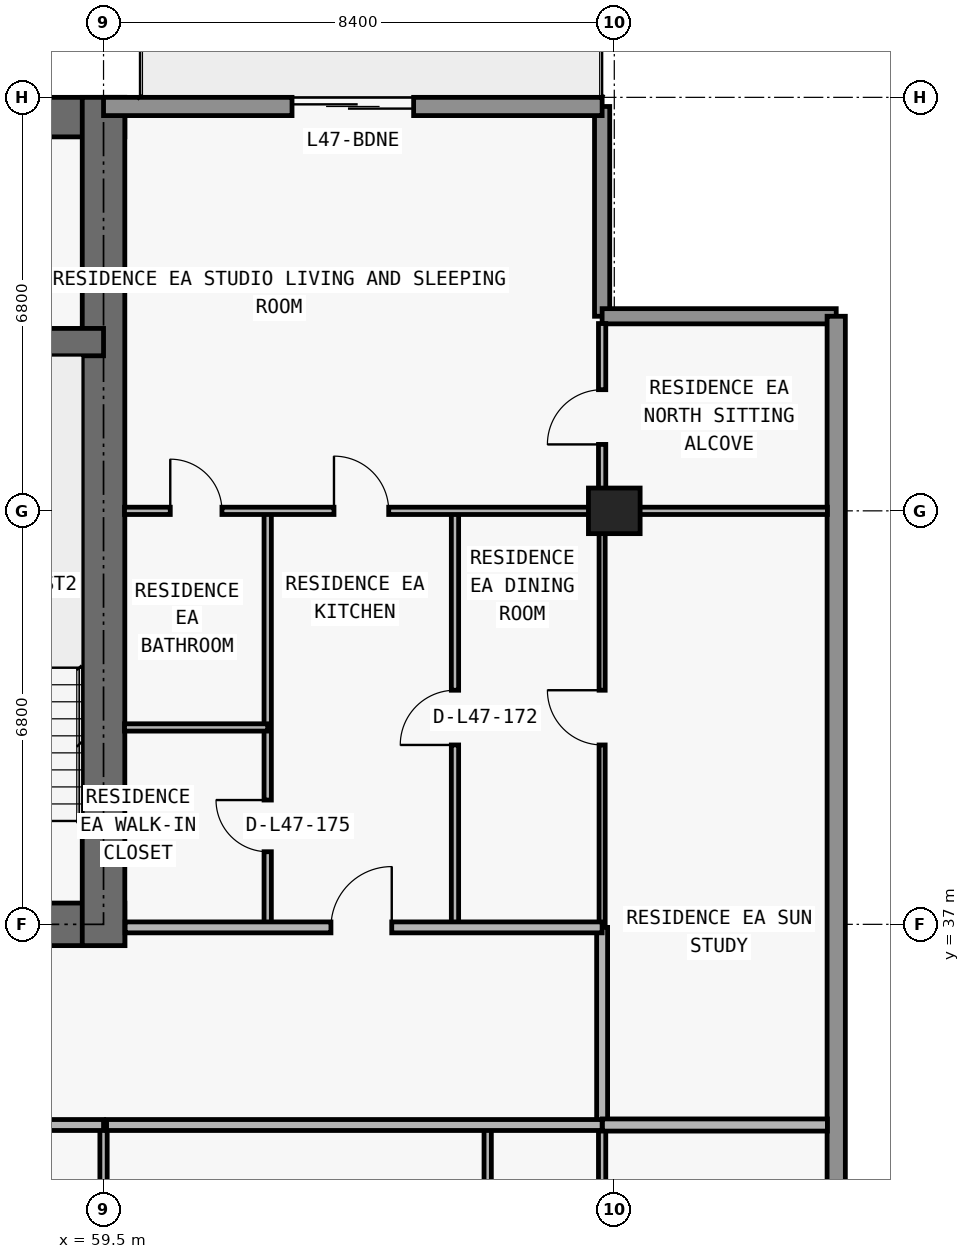
"""IFC4 building model, lengths in metres.
Left out: names, types, materials, properties, quantities, classifications, styles, units other than length and angle.
Written with IfcOpenShell. Run it as: python <this file> out.ifc"""

import sys

from ifc_helpers import new_model, si_unit, direction, frame, frame_2d, origin, origin_2d, place, context, subcontext, project, spatial, rectangle, extrude, element, fill, save


model = new_model("IFC4")
c1 = context("Model", 3, precision=1e-05, world=origin(), true_north=direction((0.0, 1.0)))
c2 = subcontext(c1, "Body", "Model", "MODEL_VIEW")
j1 = project(units=[si_unit("LENGTHUNIT", "METRE"), si_unit("PLANEANGLEUNIT", "RADIAN")], contexts=[c1])
p1 = place(None, origin())
s1 = spatial("IfcSite", under=j1, at=p1, CompositionType="ELEMENT")
p2 = place(p1, origin())
s2 = spatial("IfcBuilding", under=s1, at=p2, CompositionType="ELEMENT")
p3 = place(p2, frame((0.0, 0.0, 170.4)))
s3 = spatial("IfcBuildingStorey", under=s2, at=p3, CompositionType="ELEMENT", Elevation=170.4)
p4 = place(p3, frame((67.9, 43.8, 0.0), z_axis=(0.0, 0.0, 1.0), x_axis=(1.0, 0.0, 0.0)))
e1 = element("IfcColumn", 1, at=p4, inside=s3, PredefinedType="COLUMN", context=c2, shape_type="SweptSolid", body=[
    extrude(rectangle(XDim=0.85, YDim=0.75, at=origin_2d()), origin(), (0.0, 0.0, 1.0), 3.05),
])
p5 = place(p3, frame((17.95, 37.0, 0.0), z_axis=(0.0, 0.0, 1.0), x_axis=(1.0, 0.0, 0.0)))
e2 = element("IfcWall", 2, at=p5, inside=s3, PredefinedType="SHEAR", context=c2, shape_type="SweptSolid", body=[
    extrude(rectangle(XDim=41.9, YDim=0.7, at=frame_2d((20.95, 0.0))), origin(), (0.0, 0.0, 1.0), 3.05),
])
p6 = place(p5, frame((14.35, 0.0, 0.0)))
e3 = element("IfcOpeningElement", 3, at=p6, cuts=e2, PredefinedType="OPENING", context=c2, shape_type="SweptSolid", body=[
    extrude(rectangle(XDim=1.1, YDim=2.15, at=frame_2d((0.55, 1.075))), frame((0.0, 0.36, 0.0), z_axis=(0.0, -1.0, 0.0), x_axis=(1.0, 0.0, 0.0)), (0.0, 0.0, 1.0), 0.72),
])
p7 = place(p5, frame((6.2, 0.0, 0.0)))
e4 = element("IfcOpeningElement", 4, at=p7, cuts=e2, PredefinedType="OPENING", context=c2, shape_type="SweptSolid", body=[
    extrude(rectangle(XDim=1.05, YDim=2.15, at=frame_2d((0.525, 1.075))), frame((0.0, 0.36, 0.0), z_axis=(0.0, -1.0, 0.0), x_axis=(1.0, 0.0, 0.0)), (0.0, 0.0, 1.0), 0.72),
])
p8 = place(p5, frame((34.7, 0.0, 0.0)))
e5 = element("IfcOpeningElement", 5, at=p8, cuts=e2, PredefinedType="OPENING", context=c2, shape_type="SweptSolid", body=[
    extrude(rectangle(XDim=1.05, YDim=2.15, at=frame_2d((0.525, 1.075))), frame((0.0, 0.36, 0.0), z_axis=(0.0, -1.0, 0.0), x_axis=(1.0, 0.0, 0.0)), (0.0, 0.0, 1.0), 0.72),
])
p9 = place(p5, frame((10.812, 0.0, 0.0)))
e6 = element("IfcOpeningElement", 6, at=p9, cuts=e2, PredefinedType="OPENING", context=c2, shape_type="SweptSolid", body=[
    extrude(rectangle(XDim=1.05, YDim=2.15, at=frame_2d((0.525, 1.075))), frame((0.0, 0.36, 0.0), z_axis=(0.0, -1.0, 0.0), x_axis=(1.0, 0.0, 0.0)), (0.0, 0.0, 1.0), 0.72),
])
p10 = place(p5, frame((24.05, 0.0, 0.0)))
e7 = element("IfcOpeningElement", 7, at=p10, cuts=e2, PredefinedType="OPENING", context=c2, shape_type="SweptSolid", body=[
    extrude(rectangle(XDim=1.05, YDim=2.15, at=frame_2d((0.525, 1.075))), frame((0.0, 0.36, 0.0), z_axis=(0.0, -1.0, 0.0), x_axis=(1.0, 0.0, 0.0)), (0.0, 0.0, 1.0), 0.72),
])
p11 = place(p3, frame((17.95, 50.275, 0.0), z_axis=(0.0, 0.0, 1.0), x_axis=(1.0, 0.0, 0.0)))
e8 = element("IfcWall", 8, at=p11, inside=s3, PredefinedType="SHEAR", context=c2, shape_type="SweptSolid", body=[
    extrude(rectangle(XDim=41.9, YDim=0.65, at=frame_2d((20.95, 0.0))), origin(), (0.0, 0.0, 1.0), 3.05),
])
p12 = place(p3, frame((59.5, 36.65, 0.0), z_axis=(0.0, 0.0, 1.0), x_axis=(0.0, 1.0, 0.0)))
e9 = element("IfcWall", 9, at=p12, inside=s3, PredefinedType="SHEAR", context=c2, shape_type="SweptSolid", body=[
    extrude(rectangle(XDim=13.95, YDim=0.7, at=frame_2d((6.975, 0.0))), origin(), (0.0, 0.0, 1.0), 3.05),
])
p13 = place(p3, frame((18.3, 46.575, 0.0), z_axis=(0.0, 0.0, 1.0), x_axis=(1.0, 0.0, 0.0)))
e10 = element("IfcWall", 10, at=p13, inside=s3, PredefinedType="SHEAR", context=c2, shape_type="SweptSolid", body=[
    extrude(rectangle(XDim=41.2, YDim=0.45, at=frame_2d((20.6, 0.0))), origin(), (0.0, 0.0, 1.0), 3.05),
])
p14 = place(p13, frame((7.575, 0.0, 0.0)))
e11 = element("IfcOpeningElement", 11, at=p14, cuts=e10, PredefinedType="OPENING", context=c2, shape_type="SweptSolid", body=[
    extrude(rectangle(XDim=1.05, YDim=2.15, at=frame_2d((0.525, 1.075))), frame((0.0, 0.235, 0.0), z_axis=(0.0, -1.0, 0.0), x_axis=(1.0, 0.0, 0.0)), (0.0, 0.0, 1.0), 0.47),
])
p15 = place(p13, frame((32.625, 0.0, 0.0)))
e12 = element("IfcOpeningElement", 12, at=p15, cuts=e10, PredefinedType="OPENING", context=c2, shape_type="SweptSolid", body=[
    extrude(rectangle(XDim=1.05, YDim=2.15, at=frame_2d((0.525, 1.075))), frame((0.0, 0.235, 0.0), z_axis=(0.0, -1.0, 0.0), x_axis=(1.0, 0.0, 0.0)), (0.0, 0.0, 1.0), 0.47),
])
p16 = place(p3, frame((67.7, 50.45, 0.0), z_axis=(0.0, 0.0, 1.0), x_axis=(0.0, -1.0, 0.0)))
e13 = element("IfcWall", 13, at=p16, inside=s3, PredefinedType="ELEMENTEDWALL", context=c2, shape_type="SweptSolid", body=[
    extrude(rectangle(XDim=3.45, YDim=0.25, at=frame_2d((1.725, 0.0))), origin(), (0.0, 0.0, 1.0), 3.05),
])
p17 = place(p3, frame((67.7, 47.0, 0.0), z_axis=(0.0, 0.0, 1.0), x_axis=(1.0, 0.0, 0.0)))
e14 = element("IfcWall", 14, at=p17, inside=s3, PredefinedType="ELEMENTEDWALL", context=c2, shape_type="SweptSolid", body=[
    extrude(rectangle(XDim=3.85, YDim=0.25, at=frame_2d((1.925, 0.0))), origin(), (0.0, 0.0, 1.0), 3.05),
])
p18 = place(p3, frame((71.55, 47.0, 0.0), z_axis=(0.0, 0.0, 1.0), x_axis=(0.0, -1.0, 0.0)))
e15 = element("IfcWall", 15, at=p18, inside=s3, PredefinedType="STANDARD", context=c2, shape_type="SweptSolid", body=[
    extrude(rectangle(XDim=17.9, YDim=0.3, at=frame_2d((8.95, 0.0))), origin(), (0.0, 0.0, 1.0), 3.05),
])
p19 = place(p3, frame((59.5, 50.45, 0.0), z_axis=(0.0, 0.0, 1.0), x_axis=(1.0, 0.0, 0.0)))
e16 = element("IfcWall", 16, at=p19, inside=s3, PredefinedType="STANDARD", context=c2, shape_type="SweptSolid", body=[
    extrude(rectangle(XDim=8.2, YDim=0.3, at=frame_2d((4.1, 0.0))), origin(), (0.0, 0.0, 1.0), 3.05),
])
p20 = place(p19, frame((3.1, 0.0, 0.0)))
e17 = element("IfcOpeningElement", 17, at=p20, cuts=e16, PredefinedType="OPENING", context=c2, shape_type="SweptSolid", body=[
    extrude(rectangle(XDim=2.0, YDim=2.3, at=frame_2d((1.0, 1.15))), frame((0.0, 0.16, 0.0), z_axis=(0.0, -1.0, 0.0), x_axis=(1.0, 0.0, 0.0)), (0.0, 0.0, 1.0), 0.32),
])
p21 = place(p3, frame((59.5, 29.44, 0.0), z_axis=(0.0, 0.0, 1.0), x_axis=(0.0, 1.0, 0.0)))
e18 = element("IfcWall", 18, at=p21, inside=s3, PredefinedType="PARTITIONING", context=c2, shape_type="SweptSolid", body=[
    extrude(rectangle(XDim=4.26, YDim=0.12, at=frame_2d((2.13, 0.0))), origin(), (0.0, 0.0, 1.0), 2.263),
])
p22 = place(p3, frame((62.2, 37.0, 0.0), z_axis=(0.0, 0.0, 1.0), x_axis=(0.0, 1.0, 0.0)))
e19 = element("IfcWall", 19, at=p22, inside=s3, PredefinedType="PARTITIONING", context=c2, shape_type="SweptSolid", body=[
    extrude(rectangle(XDim=6.8, YDim=0.12, at=frame_2d((3.4, 0.0))), origin(), (0.0, 0.0, 1.0), 3.05),
])
p23 = place(p22, frame((1.194, 0.0, 0.0)))
e20 = element("IfcOpeningElement", 20, at=p23, cuts=e19, PredefinedType="OPENING", context=c2, shape_type="SweptSolid", body=[
    extrude(rectangle(XDim=0.85, YDim=2.1, at=frame_2d((0.425, 1.05))), frame((0.0, 0.07, 0.0), z_axis=(0.0, -1.0, 0.0), x_axis=(1.0, 0.0, 0.0)), (0.0, 0.0, 1.0), 0.14),
])
p24 = place(p3, frame((65.28, 37.0, 0.0), z_axis=(0.0, 0.0, 1.0), x_axis=(0.0, 1.0, 0.0)))
e21 = element("IfcWall", 21, at=p24, inside=s3, PredefinedType="PARTITIONING", context=c2, shape_type="SweptSolid", body=[
    extrude(rectangle(XDim=6.8, YDim=0.12, at=frame_2d((3.4, 0.0))), origin(), (0.0, 0.0, 1.0), 3.05),
])
p25 = place(p24, frame((2.95, 0.0, 0.0)))
e22 = element("IfcOpeningElement", 22, at=p25, cuts=e21, PredefinedType="OPENING", context=c2, shape_type="SweptSolid", body=[
    extrude(rectangle(XDim=0.9, YDim=2.15, at=frame_2d((0.45, 1.075))), frame((0.0, 0.07, 0.0), z_axis=(0.0, -1.0, 0.0), x_axis=(1.0, 0.0, 0.0)), (0.0, 0.0, 1.0), 0.14),
])
p26 = place(p3, frame((65.818, 29.44, 0.0), z_axis=(0.0, 0.0, 1.0), x_axis=(0.0, 1.0, 0.0)))
e23 = element("IfcWall", 23, at=p26, inside=s3, PredefinedType="PARTITIONING", context=c2, shape_type="SweptSolid", body=[
    extrude(rectangle(XDim=4.26, YDim=0.12, at=frame_2d((2.13, 0.0))), origin(), (0.0, 0.0, 1.0), 3.05),
])
p27 = place(p26, frame((1.705, 0.0, 0.0)))
e24 = element("IfcOpeningElement", 24, at=p27, cuts=e23, PredefinedType="OPENING", context=c2, shape_type="SweptSolid", body=[
    extrude(rectangle(XDim=0.85, YDim=2.1, at=frame_2d((0.425, 1.05))), frame((0.0, 0.07, 0.0), z_axis=(0.0, -1.0, 0.0), x_axis=(1.0, 0.0, 0.0)), (0.0, 0.0, 1.0), 0.14),
])
p28 = place(p3, frame((67.7, 29.44, 0.0), z_axis=(0.0, 0.0, 1.0), x_axis=(0.0, 1.0, 0.0)))
e25 = element("IfcWall", 25, at=p28, inside=s3, PredefinedType="PARTITIONING", context=c2, shape_type="SweptSolid", body=[
    extrude(rectangle(XDim=4.26, YDim=0.12, at=frame_2d((2.13, 0.0))), origin(), (0.0, 0.0, 1.0), 2.263),
])
p29 = place(p3, frame((67.7, 33.705, 0.0), z_axis=(0.0, 0.0, 1.0), x_axis=(0.0, 1.0, 0.0)))
e26 = element("IfcWall", 26, at=p29, inside=s3, PredefinedType="PARTITIONING", context=c2, shape_type="SweptSolid", body=[
    extrude(rectangle(XDim=3.245, YDim=0.18, at=frame_2d((1.623, 0.0))), origin(), (0.0, 0.0, 1.0), 2.263),
])
p30 = place(p3, frame((67.7, 37.0, 0.0), z_axis=(0.0, 0.0, 1.0), x_axis=(0.0, 1.0, 0.0)))
e27 = element("IfcWall", 27, at=p30, inside=s3, PredefinedType="MOVABLE", context=c2, shape_type="SweptSolid", body=[
    extrude(rectangle(XDim=6.8, YDim=0.1, at=frame_2d((3.4, 0.0))), origin(), (0.0, 0.0, 1.0), 2.263),
])
p31 = place(p30, frame((2.95, 0.0, 0.0)))
e28 = element("IfcOpeningElement", 28, at=p31, cuts=e27, PredefinedType="OPENING", context=c2, shape_type="SweptSolid", body=[
    extrude(rectangle(XDim=0.9, YDim=2.15, at=frame_2d((0.45, 1.075))), frame((0.0, 0.06, 0.0), z_axis=(0.0, -1.0, 0.0), x_axis=(1.0, 0.0, 0.0)), (0.0, 0.0, 1.0), 0.12),
])
p32 = place(p3, frame((67.7, 43.805, 0.0), z_axis=(0.0, 0.0, 1.0), x_axis=(0.0, 1.0, 0.0)))
e29 = element("IfcWall", 29, at=p32, inside=s3, PredefinedType="PARTITIONING", context=c2, shape_type="SweptSolid", body=[
    extrude(rectangle(XDim=3.075, YDim=0.12, at=frame_2d((1.538, 0.0))), origin(), (0.0, 0.0, 1.0), 3.05),
])
p33 = place(p32, frame((1.087, 0.0, 0.0)))
e30 = element("IfcOpeningElement", 30, at=p33, cuts=e29, PredefinedType="OPENING", context=c2, shape_type="SweptSolid", body=[
    extrude(rectangle(XDim=0.9, YDim=2.15, at=frame_2d((0.45, 1.075))), frame((0.0, 0.07, 0.0), z_axis=(0.0, -1.0, 0.0), x_axis=(1.0, 0.0, 0.0)), (0.0, 0.0, 1.0), 0.14),
])
p34 = place(p3, frame((31.4, 33.7, 0.0), z_axis=(0.0, 0.0, 1.0), x_axis=(1.0, 0.0, 0.0)))
e31 = element("IfcWall", 31, at=p34, inside=s3, PredefinedType="PARTITIONING", context=c2, shape_type="SweptSolid", body=[
    extrude(rectangle(XDim=28.1, YDim=0.18, at=frame_2d((14.05, 0.0))), origin(), (0.0, 0.0, 1.0), 3.05),
])
p35 = place(p34, frame((5.97, 0.0, 0.0)))
e32 = element("IfcOpeningElement", 32, at=p35, cuts=e31, PredefinedType="OPENING", context=c2, shape_type="SweptSolid", body=[
    extrude(rectangle(XDim=1.0, YDim=2.2, at=frame_2d((0.5, 1.1))), frame((0.0, 0.1, 0.0), z_axis=(0.0, -1.0, 0.0), x_axis=(1.0, 0.0, 0.0)), (0.0, 0.0, 1.0), 0.2),
])
p36 = place(p34, frame((13.824, 0.0, 0.0)))
e33 = element("IfcOpeningElement", 33, at=p36, cuts=e31, PredefinedType="OPENING", context=c2, shape_type="SweptSolid", body=[
    extrude(rectangle(XDim=1.0, YDim=2.2, at=frame_2d((0.5, 1.1))), frame((0.0, 0.1, 0.0), z_axis=(0.0, -1.0, 0.0), x_axis=(1.0, 0.0, 0.0)), (0.0, 0.0, 1.0), 0.2),
])
p37 = place(p34, frame((22.349, 0.0, 0.0)))
e34 = element("IfcOpeningElement", 34, at=p37, cuts=e31, PredefinedType="OPENING", context=c2, shape_type="SweptSolid", body=[
    extrude(rectangle(XDim=1.0, YDim=2.2, at=frame_2d((0.5, 1.1))), frame((0.0, 0.1, 0.0), z_axis=(0.0, -1.0, 0.0), x_axis=(1.0, 0.0, 0.0)), (0.0, 0.0, 1.0), 0.2),
])
p38 = place(p3, frame((59.55, 33.7, 0.0), z_axis=(0.0, 0.0, 1.0), x_axis=(1.0, 0.0, 0.0)))
e35 = element("IfcWall", 35, at=p38, inside=s3, PredefinedType="PARTITIONING", context=c2, shape_type="SweptSolid", body=[
    extrude(rectangle(XDim=8.15, YDim=0.18, at=frame_2d((4.075, 0.0))), origin(), (0.0, 0.0, 1.0), 3.05),
])
p39 = place(p3, frame((67.705, 33.7, 0.0), z_axis=(0.0, 0.0, 1.0), x_axis=(1.0, 0.0, 0.0)))
e36 = element("IfcWall", 36, at=p39, inside=s3, PredefinedType="PARTITIONING", context=c2, shape_type="SweptSolid", body=[
    extrude(rectangle(XDim=3.7, YDim=0.2, at=frame_2d((1.85, 0.0))), origin(), (0.0, 0.0, 1.0), 3.05),
])
p40 = place(p3, frame((59.855, 36.95, 0.0), z_axis=(0.0, 0.0, 1.0), x_axis=(1.0, 0.0, 0.0)))
e37 = element("IfcWall", 37, at=p40, inside=s3, PredefinedType="PARTITIONING", context=c2, shape_type="SweptSolid", body=[
    extrude(rectangle(XDim=7.845, YDim=0.18, at=frame_2d((3.922, 0.0))), origin(), (0.0, 0.0, 1.0), 3.05),
])
p41 = place(p40, frame((3.385, 0.0, 0.0)))
e38 = element("IfcOpeningElement", 38, at=p41, cuts=e37, PredefinedType="OPENING", context=c2, shape_type="SweptSolid", body=[
    extrude(rectangle(XDim=1.0, YDim=2.2, at=frame_2d((0.5, 1.1))), frame((0.0, 0.1, 0.0), z_axis=(0.0, -1.0, 0.0), x_axis=(1.0, 0.0, 0.0)), (0.0, 0.0, 1.0), 0.2),
])
p42 = place(p3, frame((59.845, 40.238, 0.0), z_axis=(0.0, 0.0, 1.0), x_axis=(1.0, 0.0, 0.0)))
e39 = element("IfcWall", 39, at=p42, inside=s3, PredefinedType="PARTITIONING", context=c2, shape_type="SweptSolid", body=[
    extrude(rectangle(XDim=2.355, YDim=0.12, at=frame_2d((1.177, 0.0))), origin(), (0.0, 0.0, 1.0), 3.05),
])
p43 = place(p3, frame((59.845, 43.8, 0.0), z_axis=(0.0, 0.0, 1.0), x_axis=(1.0, 0.0, 0.0)))
e40 = element("IfcWall", 40, at=p43, inside=s3, PredefinedType="PARTITIONING", context=c2, shape_type="SweptSolid", body=[
    extrude(rectangle(XDim=11.56, YDim=0.12, at=frame_2d((5.78, 0.0))), origin(), (0.0, 0.0, 1.0), 2.418),
])
p44 = place(p43, frame((3.445, 0.0, 0.0)))
e41 = element("IfcOpeningElement", 41, at=p44, cuts=e40, PredefinedType="OPENING", context=c2, shape_type="SweptSolid", body=[
    extrude(rectangle(XDim=0.9, YDim=2.15, at=frame_2d((0.45, 1.075))), frame((0.0, 0.07, 0.0), z_axis=(0.0, -1.0, 0.0), x_axis=(1.0, 0.0, 0.0)), (0.0, 0.0, 1.0), 0.14),
])
p45 = place(p43, frame((0.752, 0.0, 0.0)))
e42 = element("IfcOpeningElement", 42, at=p45, cuts=e40, PredefinedType="OPENING", context=c2, shape_type="SweptSolid", body=[
    extrude(rectangle(XDim=0.85, YDim=2.1, at=frame_2d((0.425, 1.05))), frame((0.0, 0.07, 0.0), z_axis=(0.0, -1.0, 0.0), x_axis=(1.0, 0.0, 0.0)), (0.0, 0.0, 1.0), 0.14),
])
p46 = place(p20, origin())
e43 = element("IfcDoor", 43, at=p46, inside=s3, OperationType="DOUBLE_DOOR_SLIDING", PredefinedType="DOOR", context=c2, shape_type="SweptSolid", body=[
    extrude(rectangle(XDim=2.0, YDim=2.3, at=frame_2d((1.0, 1.15))), frame((0.0, 0.025, 0.0), z_axis=(0.0, -1.0, 0.0), x_axis=(1.0, 0.0, 0.0)), (0.0, 0.0, 1.0), 0.05),
])
fill(e17, e43)
p47 = place(p25, origin())
e44 = element("IfcDoor", 44, at=p47, inside=s3, OperationType="SINGLE_SWING_LEFT", PredefinedType="DOOR", context=c2, shape_type="SweptSolid", body=[
    extrude(rectangle(XDim=0.9, YDim=2.15, at=frame_2d((0.45, 1.075))), frame((0.0, 0.025, 0.0), z_axis=(0.0, -1.0, 0.0), x_axis=(1.0, 0.0, 0.0)), (0.0, 0.0, 1.0), 0.05),
])
fill(e22, e44)
p48 = place(p41, origin())
e45 = element("IfcDoor", 45, at=p48, inside=s3, OperationType="SINGLE_SWING_RIGHT", PredefinedType="DOOR", context=c2, shape_type="SweptSolid", body=[
    extrude(rectangle(XDim=1.0, YDim=2.2, at=frame_2d((0.5, 1.1))), frame((0.0, 0.025, 0.0), z_axis=(0.0, -1.0, 0.0), x_axis=(1.0, 0.0, 0.0)), (0.0, 0.0, 1.0), 0.05),
])
fill(e38, e45)
p49 = place(p44, origin())
e46 = element("IfcDoor", 46, at=p49, inside=s3, OperationType="SINGLE_SWING_LEFT", PredefinedType="DOOR", context=c2, shape_type="SweptSolid", body=[
    extrude(rectangle(XDim=0.9, YDim=2.15, at=frame_2d((0.45, 1.075))), frame((0.0, 0.025, 0.0), z_axis=(0.0, -1.0, 0.0), x_axis=(1.0, 0.0, 0.0)), (0.0, 0.0, 1.0), 0.05),
])
fill(e41, e46)
p50 = place(p23, origin())
e47 = element("IfcDoor", 47, at=p50, inside=s3, OperationType="SINGLE_SWING_RIGHT", PredefinedType="DOOR", context=c2, shape_type="SweptSolid", body=[
    extrude(rectangle(XDim=0.85, YDim=2.1, at=frame_2d((0.425, 1.05))), frame((0.0, 0.025, 0.0), z_axis=(0.0, -1.0, 0.0), x_axis=(1.0, 0.0, 0.0)), (0.0, 0.0, 1.0), 0.05),
])
fill(e20, e47)
p51 = place(p45, origin())
e48 = element("IfcDoor", 48, at=p51, inside=s3, OperationType="SINGLE_SWING_LEFT", PredefinedType="DOOR", context=c2, shape_type="SweptSolid", body=[
    extrude(rectangle(XDim=0.85, YDim=2.1, at=frame_2d((0.425, 1.05))), frame((0.0, 0.025, 0.0), z_axis=(0.0, -1.0, 0.0), x_axis=(1.0, 0.0, 0.0)), (0.0, 0.0, 1.0), 0.05),
])
fill(e42, e48)
p52 = place(p31, origin())
e49 = element("IfcDoor", 49, at=p52, inside=s3, OperationType="SINGLE_SWING_RIGHT", PredefinedType="DOOR", context=c2, shape_type="SweptSolid", body=[
    extrude(rectangle(XDim=0.9, YDim=2.15, at=frame_2d((0.45, 1.075))), frame((0.0, 0.025, 0.0), z_axis=(0.0, -1.0, 0.0), x_axis=(1.0, 0.0, 0.0)), (0.0, 0.0, 1.0), 0.05),
])
fill(e28, e49)
p53 = place(p33, origin())
e50 = element("IfcDoor", 50, at=p53, inside=s3, OperationType="SINGLE_SWING_LEFT", PredefinedType="DOOR", context=c2, shape_type="SweptSolid", body=[
    extrude(rectangle(XDim=0.9, YDim=2.15, at=frame_2d((0.45, 1.075))), frame((0.0, 0.025, 0.0), z_axis=(0.0, -1.0, 0.0), x_axis=(1.0, 0.0, 0.0)), (0.0, 0.0, 1.0), 0.05),
])
fill(e30, e50)
save(model, sys.argv[1])
